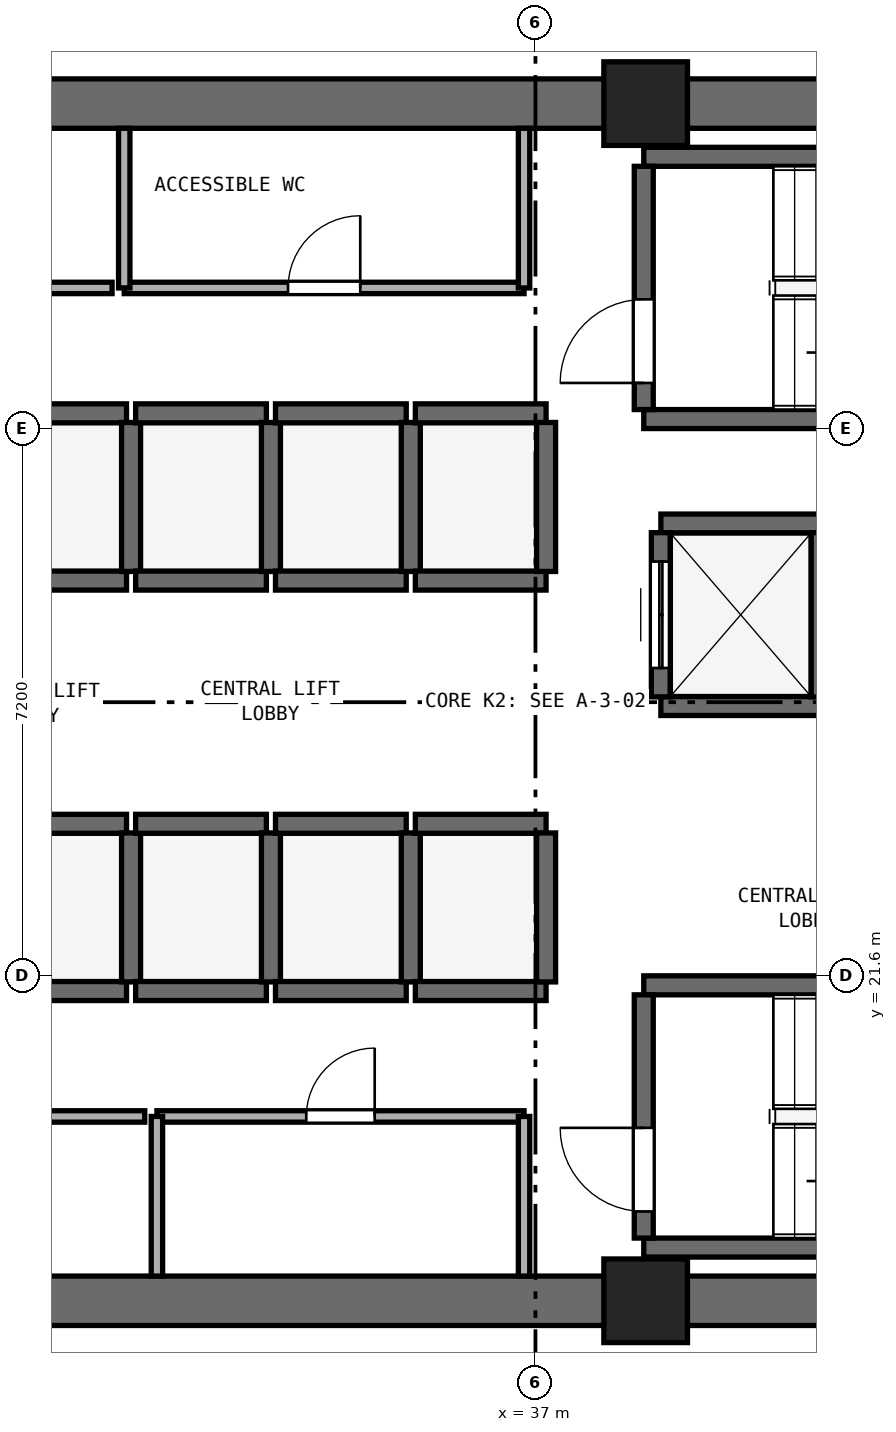
"""IFC4 building model, lengths in metres.
Left out: names, types, materials, properties, quantities, classifications, styles, units other than length and angle.
Written with IfcOpenShell. Run it as: python <this file> out.ifc"""

import sys

from ifc_helpers import new_model, si_unit, direction, frame, frame_2d, origin, origin_2d, place, context, subcontext, project, spatial, rectangle, extrude, element, fill, save


model = new_model("IFC4")
c1 = context("Model", 3, precision=1e-05, world=origin(), true_north=direction((0.0, 1.0)))
c2 = subcontext(c1, "Body", "Model", "MODEL_VIEW")
j1 = project(units=[si_unit("LENGTHUNIT", "METRE"), si_unit("PLANEANGLEUNIT", "RADIAN")], contexts=[c1])
p1 = place(None, origin())
s1 = spatial("IfcSite", under=j1, at=p1, CompositionType="ELEMENT")
p2 = place(p1, origin())
s2 = spatial("IfcBuilding", under=s1, at=p2, CompositionType="ELEMENT")
p3 = place(p2, frame((0.0, 0.0, 15.0)))
s3 = spatial("IfcBuildingStorey", under=s2, at=p3, CompositionType="ELEMENT", Elevation=15.0)
for number, where, z_axis, x_axis in (
    (1, (25.4, 17.325, 0.0), (0.0, 0.0, 1.0), (1.0, 0.0, 0.0)),
    (2, (25.4, 33.075, 0.0), (0.0, 0.0, 1.0), (1.0, 0.0, 0.0)),
):
    element("IfcWall", number, at=place(p3, frame(where, z_axis=z_axis, x_axis=x_axis)), inside=s3, PredefinedType="SHEAR", context=c2, shape_type="SweptSolid", body=[
        extrude(rectangle(XDim=23.2, YDim=0.65, at=frame_2d((11.6, 0.0))), origin(), (0.0, 0.0, 1.0), 4.68),
    ])
for number, where, z_axis, x_axis in (
    (3, (38.45, 17.325, 0.0), (0.0, 0.0, 1.0), (1.0, 0.0, 0.0)),
    (4, (38.45, 33.075, 0.0), (0.0, 0.0, 1.0), (1.0, 0.0, 0.0)),
):
    element("IfcColumn", number, at=place(p3, frame(where, z_axis=z_axis, x_axis=x_axis)), inside=s3, PredefinedType="PILASTER", context=c2, shape_type="SweptSolid", body=[
        extrude(rectangle(XDim=1.1, YDim=1.1, at=origin_2d()), origin(), (0.0, 0.0, 1.0), 5.0),
    ])
for number, where, z_axis, x_axis in (
    (5, (38.425, 28.925, 0.0), (0.0, 0.0, 1.0), (1.0, 0.0, 0.0)),
    (6, (38.425, 32.375, 0.0), (0.0, 0.0, 1.0), (1.0, 0.0, 0.0)),
):
    element("IfcWall", number, at=place(p3, frame(where, z_axis=z_axis, x_axis=x_axis)), inside=s3, PredefinedType="SHEAR", context=c2, shape_type="SweptSolid", body=[
        extrude(rectangle(XDim=7.3, YDim=0.25, at=frame_2d((3.65, 0.0))), origin(), (0.0, 0.0, 1.0), 4.68),
    ])
p4 = place(p3, frame((38.425, 29.05, 0.0), z_axis=(0.0, 0.0, 1.0), x_axis=(0.0, 1.0, 0.0)))
e7 = element("IfcWall", 7, at=p4, inside=s3, PredefinedType="SHEAR", context=c2, shape_type="SweptSolid", body=[
    extrude(rectangle(XDim=3.2, YDim=0.25, at=frame_2d((1.6, 0.0))), origin(), (0.0, 0.0, 1.0), 4.68),
])
p5 = place(p4, frame((0.35, 0.0, 0.0)))
e8 = element("IfcOpeningElement", 8, at=p5, cuts=e7, PredefinedType="OPENING", context=c2, shape_type="SweptSolid", body=[
    extrude(rectangle(XDim=1.1, YDim=2.15, at=frame_2d((0.55, 1.075))), frame((0.0, 0.135, 0.0), z_axis=(0.0, -1.0, 0.0), x_axis=(1.0, 0.0, 0.0)), (0.0, 0.0, 1.0), 0.27),
])
for number, where, z_axis, x_axis in (
    (9, (38.425, 18.025, 0.0), (0.0, 0.0, 1.0), (1.0, 0.0, 0.0)),
    (10, (38.425, 21.475, 0.0), (0.0, 0.0, 1.0), (1.0, 0.0, 0.0)),
):
    element("IfcWall", number, at=place(p3, frame(where, z_axis=z_axis, x_axis=x_axis)), inside=s3, PredefinedType="SHEAR", context=c2, shape_type="SweptSolid", body=[
        extrude(rectangle(XDim=7.3, YDim=0.25, at=frame_2d((3.65, 0.0))), origin(), (0.0, 0.0, 1.0), 4.68),
    ])
p6 = place(p3, frame((38.425, 18.15, 0.0), z_axis=(0.0, 0.0, 1.0), x_axis=(0.0, 1.0, 0.0)))
e11 = element("IfcWall", 11, at=p6, inside=s3, PredefinedType="SHEAR", context=c2, shape_type="SweptSolid", body=[
    extrude(rectangle(XDim=3.2, YDim=0.25, at=frame_2d((1.6, 0.0))), origin(), (0.0, 0.0, 1.0), 4.68),
])
p7 = place(p6, frame((0.35, 0.0, 0.0)))
e12 = element("IfcOpeningElement", 12, at=p7, cuts=e11, PredefinedType="OPENING", context=c2, shape_type="SweptSolid", body=[
    extrude(rectangle(XDim=1.1, YDim=2.15, at=frame_2d((0.55, 1.075))), frame((0.0, 0.135, 0.0), z_axis=(0.0, -1.0, 0.0), x_axis=(1.0, 0.0, 0.0)), (0.0, 0.0, 1.0), 0.27),
])
for number, where, z_axis, x_axis in (
    (13, (29.9, 21.4, 0.0), (0.0, 0.0, 1.0), (1.0, 0.0, 0.0)),
    (14, (29.9, 23.6, 0.0), (0.0, 0.0, 1.0), (1.0, 0.0, 0.0)),
):
    element("IfcWall", number, at=place(p3, frame(where, z_axis=z_axis, x_axis=x_axis)), inside=s3, PredefinedType="SHEAR", context=c2, shape_type="SweptSolid", body=[
        extrude(rectangle(XDim=1.72, YDim=0.25, at=frame_2d((0.86, 0.0))), origin(), (0.0, 0.0, 1.0), 4.68),
    ])
p8 = place(p3, frame((31.68, 21.52, 0.0), z_axis=(0.0, 0.0, 1.0), x_axis=(0.0, 1.0, 0.0)))
e15 = element("IfcWall", 15, at=p8, inside=s3, PredefinedType="SHEAR", context=c2, shape_type="SweptSolid", body=[
    extrude(rectangle(XDim=1.96, YDim=0.25, at=frame_2d((0.98, 0.0))), origin(), (0.0, 0.0, 1.0), 4.68),
])
for number, where, z_axis, x_axis in (
    (16, (31.74, 21.4, 0.0), (0.0, 0.0, 1.0), (1.0, 0.0, 0.0)),
    (17, (31.74, 23.6, 0.0), (0.0, 0.0, 1.0), (1.0, 0.0, 0.0)),
):
    element("IfcWall", number, at=place(p3, frame(where, z_axis=z_axis, x_axis=x_axis)), inside=s3, PredefinedType="SHEAR", context=c2, shape_type="SweptSolid", body=[
        extrude(rectangle(XDim=1.72, YDim=0.25, at=frame_2d((0.86, 0.0))), origin(), (0.0, 0.0, 1.0), 4.68),
    ])
p9 = place(p3, frame((33.52, 21.52, 0.0), z_axis=(0.0, 0.0, 1.0), x_axis=(0.0, 1.0, 0.0)))
e18 = element("IfcWall", 18, at=p9, inside=s3, PredefinedType="SHEAR", context=c2, shape_type="SweptSolid", body=[
    extrude(rectangle(XDim=1.96, YDim=0.25, at=frame_2d((0.98, 0.0))), origin(), (0.0, 0.0, 1.0), 4.68),
])
for number, where, z_axis, x_axis in (
    (19, (33.58, 21.4, 0.0), (0.0, 0.0, 1.0), (1.0, 0.0, 0.0)),
    (20, (33.58, 23.6, 0.0), (0.0, 0.0, 1.0), (1.0, 0.0, 0.0)),
):
    element("IfcWall", number, at=place(p3, frame(where, z_axis=z_axis, x_axis=x_axis)), inside=s3, PredefinedType="SHEAR", context=c2, shape_type="SweptSolid", body=[
        extrude(rectangle(XDim=1.72, YDim=0.25, at=frame_2d((0.86, 0.0))), origin(), (0.0, 0.0, 1.0), 4.68),
    ])
p10 = place(p3, frame((35.36, 21.52, 0.0), z_axis=(0.0, 0.0, 1.0), x_axis=(0.0, 1.0, 0.0)))
e21 = element("IfcWall", 21, at=p10, inside=s3, PredefinedType="SHEAR", context=c2, shape_type="SweptSolid", body=[
    extrude(rectangle(XDim=1.96, YDim=0.25, at=frame_2d((0.98, 0.0))), origin(), (0.0, 0.0, 1.0), 4.68),
])
for number, where, z_axis, x_axis in (
    (22, (35.42, 21.4, 0.0), (0.0, 0.0, 1.0), (1.0, 0.0, 0.0)),
    (23, (35.42, 23.6, 0.0), (0.0, 0.0, 1.0), (1.0, 0.0, 0.0)),
):
    element("IfcWall", number, at=place(p3, frame(where, z_axis=z_axis, x_axis=x_axis)), inside=s3, PredefinedType="SHEAR", context=c2, shape_type="SweptSolid", body=[
        extrude(rectangle(XDim=1.72, YDim=0.25, at=frame_2d((0.86, 0.0))), origin(), (0.0, 0.0, 1.0), 4.68),
    ])
p11 = place(p3, frame((37.14, 21.52, 0.0), z_axis=(0.0, 0.0, 1.0), x_axis=(0.0, 1.0, 0.0)))
e24 = element("IfcWall", 24, at=p11, inside=s3, PredefinedType="SHEAR", context=c2, shape_type="SweptSolid", body=[
    extrude(rectangle(XDim=1.96, YDim=0.25, at=frame_2d((0.98, 0.0))), origin(), (0.0, 0.0, 1.0), 4.68),
])
for number, where, z_axis, x_axis in (
    (25, (29.9, 26.8, 0.0), (0.0, 0.0, 1.0), (1.0, 0.0, 0.0)),
    (26, (29.9, 29.0, 0.0), (0.0, 0.0, 1.0), (1.0, 0.0, 0.0)),
):
    element("IfcWall", number, at=place(p3, frame(where, z_axis=z_axis, x_axis=x_axis)), inside=s3, PredefinedType="SHEAR", context=c2, shape_type="SweptSolid", body=[
        extrude(rectangle(XDim=1.72, YDim=0.25, at=frame_2d((0.86, 0.0))), origin(), (0.0, 0.0, 1.0), 4.68),
    ])
p12 = place(p3, frame((31.68, 26.92, 0.0), z_axis=(0.0, 0.0, 1.0), x_axis=(0.0, 1.0, 0.0)))
e27 = element("IfcWall", 27, at=p12, inside=s3, PredefinedType="SHEAR", context=c2, shape_type="SweptSolid", body=[
    extrude(rectangle(XDim=1.96, YDim=0.25, at=frame_2d((0.98, 0.0))), origin(), (0.0, 0.0, 1.0), 4.68),
])
for number, where, z_axis, x_axis in (
    (28, (31.74, 26.8, 0.0), (0.0, 0.0, 1.0), (1.0, 0.0, 0.0)),
    (29, (31.74, 29.0, 0.0), (0.0, 0.0, 1.0), (1.0, 0.0, 0.0)),
):
    element("IfcWall", number, at=place(p3, frame(where, z_axis=z_axis, x_axis=x_axis)), inside=s3, PredefinedType="SHEAR", context=c2, shape_type="SweptSolid", body=[
        extrude(rectangle(XDim=1.72, YDim=0.25, at=frame_2d((0.86, 0.0))), origin(), (0.0, 0.0, 1.0), 4.68),
    ])
p13 = place(p3, frame((33.52, 26.92, 0.0), z_axis=(0.0, 0.0, 1.0), x_axis=(0.0, 1.0, 0.0)))
e30 = element("IfcWall", 30, at=p13, inside=s3, PredefinedType="SHEAR", context=c2, shape_type="SweptSolid", body=[
    extrude(rectangle(XDim=1.96, YDim=0.25, at=frame_2d((0.98, 0.0))), origin(), (0.0, 0.0, 1.0), 4.68),
])
for number, where, z_axis, x_axis in (
    (31, (33.58, 26.8, 0.0), (0.0, 0.0, 1.0), (1.0, 0.0, 0.0)),
    (32, (33.58, 29.0, 0.0), (0.0, 0.0, 1.0), (1.0, 0.0, 0.0)),
):
    element("IfcWall", number, at=place(p3, frame(where, z_axis=z_axis, x_axis=x_axis)), inside=s3, PredefinedType="SHEAR", context=c2, shape_type="SweptSolid", body=[
        extrude(rectangle(XDim=1.72, YDim=0.25, at=frame_2d((0.86, 0.0))), origin(), (0.0, 0.0, 1.0), 4.68),
    ])
p14 = place(p3, frame((35.36, 26.92, 0.0), z_axis=(0.0, 0.0, 1.0), x_axis=(0.0, 1.0, 0.0)))
e33 = element("IfcWall", 33, at=p14, inside=s3, PredefinedType="SHEAR", context=c2, shape_type="SweptSolid", body=[
    extrude(rectangle(XDim=1.96, YDim=0.25, at=frame_2d((0.98, 0.0))), origin(), (0.0, 0.0, 1.0), 4.68),
])
for number, where, z_axis, x_axis in (
    (34, (35.42, 26.8, 0.0), (0.0, 0.0, 1.0), (1.0, 0.0, 0.0)),
    (35, (35.42, 29.0, 0.0), (0.0, 0.0, 1.0), (1.0, 0.0, 0.0)),
):
    element("IfcWall", number, at=place(p3, frame(where, z_axis=z_axis, x_axis=x_axis)), inside=s3, PredefinedType="SHEAR", context=c2, shape_type="SweptSolid", body=[
        extrude(rectangle(XDim=1.72, YDim=0.25, at=frame_2d((0.86, 0.0))), origin(), (0.0, 0.0, 1.0), 4.68),
    ])
p15 = place(p3, frame((37.14, 26.92, 0.0), z_axis=(0.0, 0.0, 1.0), x_axis=(0.0, 1.0, 0.0)))
e36 = element("IfcWall", 36, at=p15, inside=s3, PredefinedType="SHEAR", context=c2, shape_type="SweptSolid", body=[
    extrude(rectangle(XDim=1.96, YDim=0.25, at=frame_2d((0.98, 0.0))), origin(), (0.0, 0.0, 1.0), 4.68),
])
for number, where, z_axis, x_axis in (
    (37, (38.65, 25.15, 0.0), (0.0, 0.0, 1.0), (1.0, 0.0, 0.0)),
    (38, (38.65, 27.55, 0.0), (0.0, 0.0, 1.0), (1.0, 0.0, 0.0)),
):
    element("IfcWall", number, at=place(p3, frame(where, z_axis=z_axis, x_axis=x_axis)), inside=s3, PredefinedType="SHEAR", context=c2, shape_type="SweptSolid", body=[
        extrude(rectangle(XDim=2.1, YDim=0.25, at=frame_2d((1.05, 0.0))), origin(), (0.0, 0.0, 1.0), 4.68),
    ])
p16 = place(p3, frame((38.65, 25.27, 0.0), z_axis=(0.0, 0.0, 1.0), x_axis=(0.0, 1.0, 0.0)))
e39 = element("IfcWall", 39, at=p16, inside=s3, PredefinedType="SHEAR", context=c2, shape_type="SweptSolid", body=[
    extrude(rectangle(XDim=2.16, YDim=0.25, at=frame_2d((1.08, 0.0))), origin(), (0.0, 0.0, 1.0), 4.68),
])
p17 = place(p16, frame((0.38, 0.0, 0.0)))
e40 = element("IfcOpeningElement", 40, at=p17, cuts=e39, PredefinedType="OPENING", context=c2, shape_type="SweptSolid", body=[
    extrude(rectangle(XDim=1.4, YDim=2.2, at=frame_2d((0.7, 1.1))), frame((0.0, 0.135, 0.0), z_axis=(0.0, -1.0, 0.0), x_axis=(1.0, 0.0, 0.0)), (0.0, 0.0, 1.0), 0.27),
])
p18 = place(p3, frame((40.75, 25.27, 0.0), z_axis=(0.0, 0.0, 1.0), x_axis=(0.0, 1.0, 0.0)))
e41 = element("IfcWall", 41, at=p18, inside=s3, PredefinedType="SHEAR", context=c2, shape_type="SweptSolid", body=[
    extrude(rectangle(XDim=2.16, YDim=0.25, at=frame_2d((1.08, 0.0))), origin(), (0.0, 0.0, 1.0), 4.68),
])
p19 = place(p3, frame((26.17, 30.65, 0.0), z_axis=(0.0, 0.0, 1.0), x_axis=(1.0, 0.0, 0.0)))
e42 = element("IfcWall", 42, at=p19, inside=s3, PredefinedType="PARTITIONING", context=c2, shape_type="SweptSolid", body=[
    extrude(rectangle(XDim=5.26, YDim=0.15, at=frame_2d((2.63, 0.0))), origin(), (0.0, 0.0, 1.0), 4.68),
])
p20 = place(p19, frame((2.155, 0.0, 0.0)))
e43 = element("IfcOpeningElement", 43, at=p20, cuts=e42, PredefinedType="OPENING", context=c2, shape_type="SweptSolid", body=[
    extrude(rectangle(XDim=0.95, YDim=2.1, at=frame_2d((0.475, 1.05))), frame((0.0, 0.085, 0.0), z_axis=(0.0, -1.0, 0.0), x_axis=(1.0, 0.0, 0.0)), (0.0, 0.0, 1.0), 0.17),
])
p21 = place(p3, frame((31.59, 30.65, 0.0), z_axis=(0.0, 0.0, 1.0), x_axis=(1.0, 0.0, 0.0)))
e44 = element("IfcWall", 44, at=p21, inside=s3, PredefinedType="PARTITIONING", context=c2, shape_type="SweptSolid", body=[
    extrude(rectangle(XDim=5.26, YDim=0.15, at=frame_2d((2.63, 0.0))), origin(), (0.0, 0.0, 1.0), 4.68),
])
p22 = place(p21, frame((2.155, 0.0, 0.0)))
e45 = element("IfcOpeningElement", 45, at=p22, cuts=e44, PredefinedType="OPENING", context=c2, shape_type="SweptSolid", body=[
    extrude(rectangle(XDim=0.95, YDim=2.1, at=frame_2d((0.475, 1.05))), frame((0.0, 0.085, 0.0), z_axis=(0.0, -1.0, 0.0), x_axis=(1.0, 0.0, 0.0)), (0.0, 0.0, 1.0), 0.17),
])
for number, where, z_axis, x_axis in (
    (46, (31.59, 30.65, 0.0), (0.0, 0.0, 1.0), (0.0, 1.0, 0.0)),
    (47, (36.85, 30.65, 0.0), (0.0, 0.0, 1.0), (0.0, 1.0, 0.0)),
):
    element("IfcWall", number, at=place(p3, frame(where, z_axis=z_axis, x_axis=x_axis)), inside=s3, PredefinedType="PARTITIONING", context=c2, shape_type="SweptSolid", body=[
        extrude(rectangle(XDim=2.1, YDim=0.15, at=frame_2d((1.05, 0.0))), origin(), (0.0, 0.0, 1.0), 4.68),
    ])
p23 = place(p3, frame((26.17, 19.75, 0.0), z_axis=(0.0, 0.0, 1.0), x_axis=(1.0, 0.0, 0.0)))
e48 = element("IfcWall", 48, at=p23, inside=s3, PredefinedType="PARTITIONING", context=c2, shape_type="SweptSolid", body=[
    extrude(rectangle(XDim=5.69, YDim=0.15, at=frame_2d((2.845, 0.0))), origin(), (0.0, 0.0, 1.0), 4.68),
])
p24 = place(p23, frame((2.37, 0.0, 0.0)))
e49 = element("IfcOpeningElement", 49, at=p24, cuts=e48, PredefinedType="OPENING", context=c2, shape_type="SweptSolid", body=[
    extrude(rectangle(XDim=0.95, YDim=2.1, at=frame_2d((0.475, 1.05))), frame((0.0, 0.085, 0.0), z_axis=(0.0, -1.0, 0.0), x_axis=(1.0, 0.0, 0.0)), (0.0, 0.0, 1.0), 0.17),
])
p25 = place(p3, frame((32.02, 19.75, 0.0), z_axis=(0.0, 0.0, 1.0), x_axis=(1.0, 0.0, 0.0)))
e50 = element("IfcWall", 50, at=p25, inside=s3, PredefinedType="PARTITIONING", context=c2, shape_type="SweptSolid", body=[
    extrude(rectangle(XDim=4.83, YDim=0.15, at=frame_2d((2.415, 0.0))), origin(), (0.0, 0.0, 1.0), 4.68),
])
p26 = place(p25, frame((1.965, 0.0, 0.0)))
e51 = element("IfcOpeningElement", 51, at=p26, cuts=e50, PredefinedType="OPENING", context=c2, shape_type="SweptSolid", body=[
    extrude(rectangle(XDim=0.9, YDim=2.1, at=frame_2d((0.45, 1.05))), frame((0.0, 0.085, 0.0), z_axis=(0.0, -1.0, 0.0), x_axis=(1.0, 0.0, 0.0)), (0.0, 0.0, 1.0), 0.17),
])
for number, where, z_axis, x_axis in (
    (52, (32.02, 17.65, 0.0), (0.0, 0.0, 1.0), (0.0, 1.0, 0.0)),
    (53, (36.85, 17.65, 0.0), (0.0, 0.0, 1.0), (0.0, 1.0, 0.0)),
):
    element("IfcWall", number, at=place(p3, frame(where, z_axis=z_axis, x_axis=x_axis)), inside=s3, PredefinedType="PARTITIONING", context=c2, shape_type="SweptSolid", body=[
        extrude(rectangle(XDim=2.1, YDim=0.15, at=frame_2d((1.05, 0.0))), origin(), (0.0, 0.0, 1.0), 4.68),
    ])
p27 = place(p5, origin())
e54 = element("IfcDoor", 54, at=p27, inside=s3, OperationType="SINGLE_SWING_LEFT", PredefinedType="DOOR", context=c2, shape_type="SweptSolid", body=[
    extrude(rectangle(XDim=1.1, YDim=2.15, at=frame_2d((0.55, 1.075))), frame((0.0, 0.025, 0.0), z_axis=(0.0, -1.0, 0.0), x_axis=(1.0, 0.0, 0.0)), (0.0, 0.0, 1.0), 0.05),
])
fill(e8, e54)
p28 = place(p7, origin())
e55 = element("IfcDoor", 55, at=p28, inside=s3, OperationType="SINGLE_SWING_RIGHT", PredefinedType="DOOR", context=c2, shape_type="SweptSolid", body=[
    extrude(rectangle(XDim=1.1, YDim=2.15, at=frame_2d((0.55, 1.075))), frame((0.0, 0.025, 0.0), z_axis=(0.0, -1.0, 0.0), x_axis=(1.0, 0.0, 0.0)), (0.0, 0.0, 1.0), 0.05),
])
fill(e12, e55)
p29 = place(p17, origin())
e56 = element("IfcDoor", 56, at=p29, inside=s3, OperationType="DOUBLE_DOOR_SLIDING", PredefinedType="DOOR", context=c2, shape_type="SweptSolid", body=[
    extrude(rectangle(XDim=1.4, YDim=2.2, at=frame_2d((0.7, 1.1))), frame((0.0, 0.025, 0.0), z_axis=(0.0, -1.0, 0.0), x_axis=(1.0, 0.0, 0.0)), (0.0, 0.0, 1.0), 0.05),
])
fill(e40, e56)
p30 = place(p22, origin())
e57 = element("IfcDoor", 57, at=p30, inside=s3, OperationType="SINGLE_SWING_RIGHT", PredefinedType="DOOR", context=c2, shape_type="SweptSolid", body=[
    extrude(rectangle(XDim=0.95, YDim=2.1, at=frame_2d((0.475, 1.05))), frame((0.0, 0.025, 0.0), z_axis=(0.0, -1.0, 0.0), x_axis=(1.0, 0.0, 0.0)), (0.0, 0.0, 1.0), 0.05),
])
fill(e45, e57)
p31 = place(p26, origin())
e58 = element("IfcDoor", 58, at=p31, inside=s3, OperationType="SINGLE_SWING_RIGHT", PredefinedType="DOOR", context=c2, shape_type="SweptSolid", body=[
    extrude(rectangle(XDim=0.9, YDim=2.1, at=frame_2d((0.45, 1.05))), frame((0.0, 0.025, 0.0), z_axis=(0.0, -1.0, 0.0), x_axis=(1.0, 0.0, 0.0)), (0.0, 0.0, 1.0), 0.05),
])
fill(e51, e58)
save(model, sys.argv[1])
